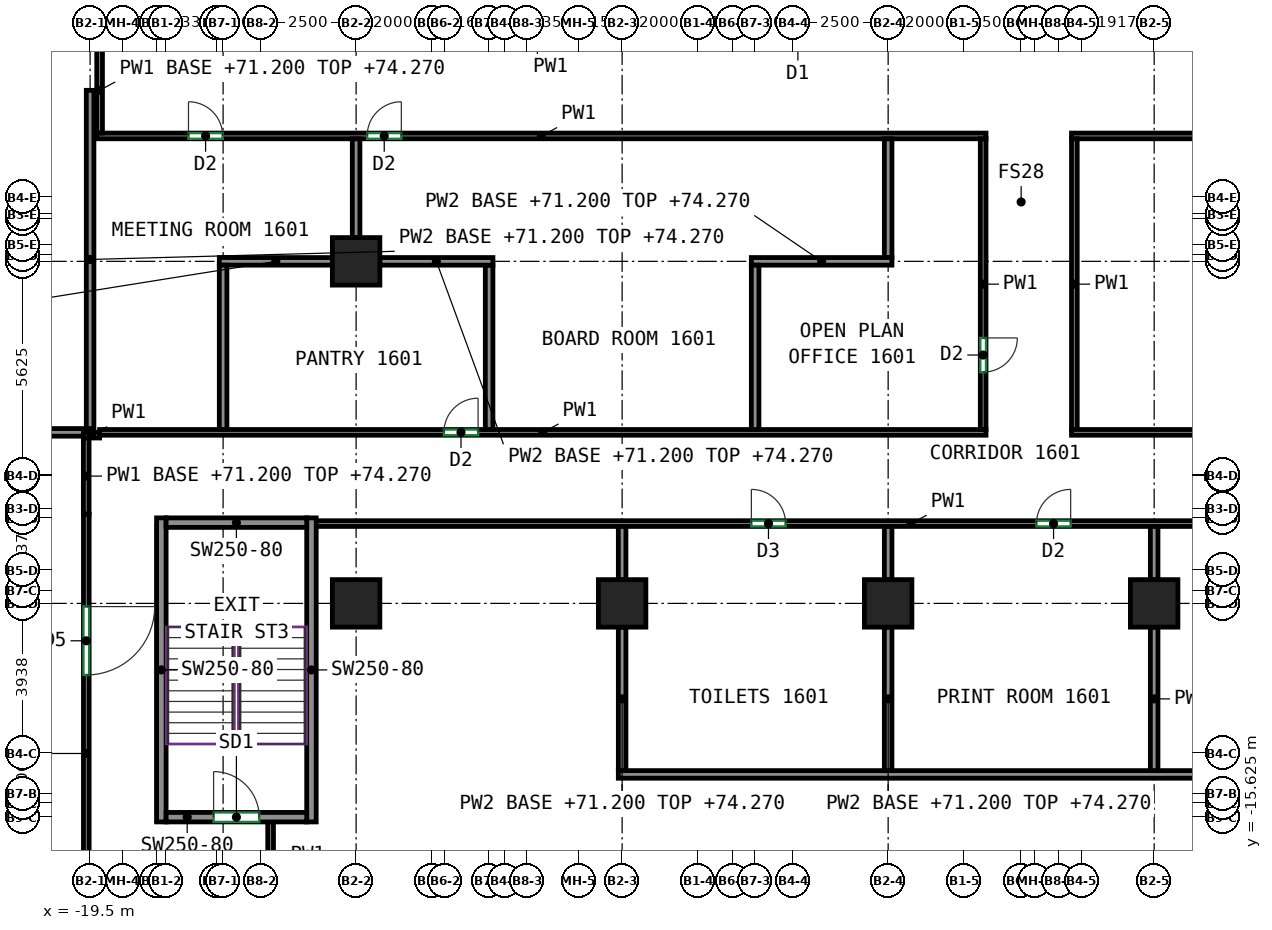
"""IFC4 building model, lengths in metres.
Left out: names, types, materials, properties, quantities, classifications, styles, units other than length and angle.
Written with IfcOpenShell. Run it as: python <this file> out.ifc"""

import sys

from ifc_helpers import new_model, si_unit, direction, frame, frame_2d, origin, origin_2d, place, context, subcontext, project, spatial, rectangle, extrude, source, transform, mapped, element, fill, save


model = new_model("IFC4")
c1 = context("Model", 3, precision=1e-05, world=origin(), true_north=direction((0.0, 1.0)))
c2 = subcontext(c1, "Body", "Model", "MODEL_VIEW")
j1 = project(units=[si_unit("LENGTHUNIT", "METRE"), si_unit("PLANEANGLEUNIT", "RADIAN")], contexts=[c1])
p1 = place(None, origin())
s1 = spatial("IfcSite", under=j1, at=p1, CompositionType="ELEMENT")
p2 = place(p1, origin())
s2 = spatial("IfcBuilding", under=s1, at=p2, CompositionType="ELEMENT")
p3 = place(p2, frame((0.0, 0.0, 71.2)))
s3 = spatial("IfcBuildingStorey", under=s2, at=p3, CompositionType="ELEMENT", Elevation=71.2)
m1 = source(origin(), c2, "Body", "SweptSolid", [
    extrude(rectangle(XDim=1.25, YDim=1.25, at=origin_2d()), origin(), (0.0, 0.0, 1.0), 3.72),
])
for number, where, z_axis, x_axis in (
    (1, (-12.5, -10.0, 0.0), (0.0, 0.0, 1.0), (1.0, 0.0, 0.0)),
    (2, (-12.5, -1.0, 0.0), (0.0, 0.0, 1.0), (1.0, 0.0, 0.0)),
    (3, (-5.5, -10.0, 0.0), (0.0, 0.0, 1.0), (1.0, 0.0, 0.0)),
    (4, (1.5, -10.0, 0.0), (0.0, 0.0, 1.0), (1.0, 0.0, 0.0)),
    (5, (8.5, -10.0, 0.0), (0.0, 0.0, 1.0), (1.0, 0.0, 0.0)),
):
    element("IfcColumn", number, at=place(p3, frame(where, z_axis=z_axis, x_axis=x_axis)), inside=s3, PredefinedType="COLUMN", context=c2, shape_type="MappedRepresentation", body=[
        mapped(m1, transform((0.0, 0.0, 0.0))),
    ])
m2 = source(origin(), c2, "Body", "SweptSolid", [
    extrude(rectangle(XDim=8.0, YDim=0.25, at=frame_2d((4.0, 0.0))), origin(), (0.0, 0.0, 1.0), 3.72),
])
for number, where, z_axis, x_axis in (
    (6, (-17.625, -15.75, 0.0), (0.0, 0.0, 1.0), (0.0, 1.0, 0.0)),
    (7, (-13.675, -15.75, 0.0), (0.0, 0.0, 1.0), (0.0, 1.0, 0.0)),
):
    element("IfcWall", number, at=place(p3, frame(where, z_axis=z_axis, x_axis=x_axis)), inside=s3, PredefinedType="SHEAR", context=c2, shape_type="MappedRepresentation", body=[
        mapped(m2, transform((0.0, 0.0, 0.0))),
    ])
m3 = source(origin(), c2, "Body", "SweptSolid", [
    extrude(rectangle(XDim=3.7, YDim=0.25, at=frame_2d((1.85, 0.0))), origin(), (0.0, 0.0, 1.0), 3.72),
])
p4 = place(p3, frame((-17.5, -15.625, 0.0), z_axis=(0.0, 0.0, 1.0), x_axis=(1.0, 0.0, 0.0)))
e8 = element("IfcWall", 8, at=p4, inside=s3, PredefinedType="SHEAR", context=c2, shape_type="MappedRepresentation", body=[
    mapped(m3, transform((0.0, 0.0, 0.0))),
])
p5 = place(p4, frame((1.25, 0.0, 0.0)))
e9 = element("IfcOpeningElement", 9, at=p5, cuts=e8, PredefinedType="OPENING", context=c2, shape_type="SweptSolid", body=[
    extrude(rectangle(XDim=1.2, YDim=2.1, at=frame_2d((0.6, 1.05))), frame((0.0, 0.135, 0.0), z_axis=(0.0, -1.0, 0.0), x_axis=(1.0, 0.0, 0.0)), (0.0, 0.0, 1.0), 0.27),
])
p6 = place(p3, frame((-17.5, -7.875, 0.0), z_axis=(0.0, 0.0, 1.0), x_axis=(1.0, 0.0, 0.0)))
e10 = element("IfcWall", 10, at=p6, inside=s3, PredefinedType="SHEAR", context=c2, shape_type="MappedRepresentation", body=[
    mapped(m3, transform((0.0, 0.0, 0.0))),
])
p7 = place(p3, frame((-19.25, -5.573, 0.0), z_axis=(0.0, 0.0, 1.0), x_axis=(-1.0, 0.0, 0.0)))
e11 = element("IfcWall", 11, at=p7, inside=s3, PredefinedType="PARTITIONING", context=c2, shape_type="SweptSolid", body=[
    extrude(rectangle(XDim=0.427, YDim=0.15, at=frame_2d((0.213, 0.0))), origin(), (0.0, 0.0, 1.0), 3.72),
])
p8 = place(p3, frame((-13.6, -7.9, 0.0), z_axis=(0.0, 0.0, 1.0), x_axis=(1.0, 0.0, 0.0)))
e12 = element("IfcWall", 12, at=p8, inside=s3, PredefinedType="PARTITIONING", context=c2, shape_type="SweptSolid", body=[
    extrude(rectangle(XDim=31.4, YDim=0.15, at=frame_2d((15.7, 0.0))), origin(), (0.0, 0.0, 1.0), 3.72),
])
p9 = place(p8, frame((11.501, 0.0, 0.0)))
e13 = element("IfcOpeningElement", 13, at=p9, cuts=e12, PredefinedType="OPENING", context=c2, shape_type="SweptSolid", body=[
    extrude(rectangle(XDim=0.9, YDim=2.1, at=frame_2d((0.45, 1.05))), frame((0.0, 0.085, 0.0), z_axis=(0.0, -1.0, 0.0), x_axis=(1.0, 0.0, 0.0)), (0.0, 0.0, 1.0), 0.17),
])
p10 = place(p8, frame((19.003, 0.0, 0.0)))
e14 = element("IfcOpeningElement", 14, at=p10, cuts=e12, PredefinedType="OPENING", context=c2, shape_type="SweptSolid", body=[
    extrude(rectangle(XDim=0.9, YDim=2.1, at=frame_2d((0.45, 1.05))), frame((0.0, 0.085, 0.0), z_axis=(0.0, -1.0, 0.0), x_axis=(1.0, 0.0, 0.0)), (0.0, 0.0, 1.0), 0.17),
])
p11 = place(p8, frame((23.291, 0.0, 0.0)))
e15 = element("IfcOpeningElement", 15, at=p11, cuts=e12, PredefinedType="OPENING", context=c2, shape_type="SweptSolid", body=[
    extrude(rectangle(XDim=0.9, YDim=2.1, at=frame_2d((0.45, 1.05))), frame((0.0, 0.085, 0.0), z_axis=(0.0, -1.0, 0.0), x_axis=(1.0, 0.0, 0.0)), (0.0, 0.0, 1.0), 0.17),
])
p12 = place(p3, frame((-14.75, -17.475, 0.0), z_axis=(0.0, 0.0, 1.0), x_axis=(0.0, 1.0, 0.0)))
e16 = element("IfcWall", 16, at=p12, inside=s3, PredefinedType="PARTITIONING", context=c2, shape_type="SweptSolid", body=[
    extrude(rectangle(XDim=1.725, YDim=0.15, at=frame_2d((0.863, 0.0))), origin(), (0.0, 0.0, 1.0), 3.72),
])
p13 = place(p3, frame((-19.6, -7.652, 0.0), z_axis=(0.0, 0.0, 1.0), x_axis=(0.0, -1.0, 0.0)))
e17 = element("IfcWall", 17, at=p13, inside=s3, PredefinedType="PARTITIONING", context=c2, shape_type="SweptSolid", body=[
    extrude(rectangle(XDim=8.996, YDim=0.15, at=frame_2d((4.498, 0.0))), origin(), (0.0, 0.0, 1.0), 3.07),
])
p14 = place(p13, frame((2.432, 0.0, 0.0)))
e18 = element("IfcOpeningElement", 18, at=p14, cuts=e17, PredefinedType="OPENING", context=c2, shape_type="SweptSolid", body=[
    extrude(rectangle(XDim=1.8, YDim=2.1, at=frame_2d((0.9, 1.05))), frame((0.0, 0.085, 0.0), z_axis=(0.0, -1.0, 0.0), x_axis=(1.0, 0.0, 0.0)), (0.0, 0.0, 1.0), 0.17),
])
p15 = place(p3, frame((-19.602, -7.652, 0.0), z_axis=(0.0, 0.0, 1.0), x_axis=(0.0, 1.0, 0.0)))
e19 = element("IfcWall", 19, at=p15, inside=s3, PredefinedType="PARTITIONING", context=c2, shape_type="SweptSolid", body=[
    extrude(rectangle(XDim=2.004, YDim=0.15, at=frame_2d((1.002, 0.0))), origin(), (0.0, 0.0, 1.0), 3.07),
])
p16 = place(p3, frame((-19.25, -5.5, 0.0), z_axis=(0.0, 0.0, 1.0), x_axis=(1.0, 0.0, 0.0)))
e20 = element("IfcWall", 20, at=p16, inside=s3, PredefinedType="PARTITIONING", context=c2, shape_type="SweptSolid", body=[
    extrude(rectangle(XDim=23.325, YDim=0.15, at=frame_2d((11.663, 0.0))), origin(), (0.0, 0.0, 1.0), 3.72),
])
p17 = place(p16, frame((9.06, 0.0, 0.0)))
e21 = element("IfcOpeningElement", 21, at=p17, cuts=e20, PredefinedType="OPENING", context=c2, shape_type="SweptSolid", body=[
    extrude(rectangle(XDim=0.9, YDim=2.1, at=frame_2d((0.45, 1.05))), frame((0.0, 0.085, 0.0), z_axis=(0.0, -1.0, 0.0), x_axis=(1.0, 0.0, 0.0)), (0.0, 0.0, 1.0), 0.17),
])
p18 = place(p3, frame((-19.325, 2.3, 0.0), z_axis=(0.0, 0.0, 1.0), x_axis=(1.0, 0.0, 0.0)))
e22 = element("IfcWall", 22, at=p18, inside=s3, PredefinedType="PARTITIONING", context=c2, shape_type="SweptSolid", body=[
    extrude(rectangle(XDim=23.4, YDim=0.15, at=frame_2d((11.7, 0.0))), origin(), (0.0, 0.0, 1.0), 3.72),
])
p19 = place(p18, frame((2.414, 0.0, 0.0)))
e23 = element("IfcOpeningElement", 23, at=p19, cuts=e22, PredefinedType="OPENING", context=c2, shape_type="SweptSolid", body=[
    extrude(rectangle(XDim=0.9, YDim=2.1, at=frame_2d((0.45, 1.05))), frame((0.0, 0.085, 0.0), z_axis=(0.0, -1.0, 0.0), x_axis=(1.0, 0.0, 0.0)), (0.0, 0.0, 1.0), 0.17),
])
p20 = place(p18, frame((7.115, 0.0, 0.0)))
e24 = element("IfcOpeningElement", 24, at=p20, cuts=e22, PredefinedType="OPENING", context=c2, shape_type="SweptSolid", body=[
    extrude(rectangle(XDim=0.9, YDim=2.1, at=frame_2d((0.45, 1.05))), frame((0.0, 0.085, 0.0), z_axis=(0.0, -1.0, 0.0), x_axis=(1.0, 0.0, 0.0)), (0.0, 0.0, 1.0), 0.17),
])
p21 = place(p3, frame((-19.25, 2.375, 0.0), z_axis=(0.0, 0.0, 1.0), x_axis=(0.0, 1.0, 0.0)))
e25 = element("IfcWall", 25, at=p21, inside=s3, PredefinedType="PARTITIONING", context=c2, shape_type="SweptSolid", body=[
    extrude(rectangle(XDim=2.25, YDim=0.15, at=frame_2d((1.125, 0.0))), origin(), (0.0, 0.0, 1.0), 3.07),
])
p22 = place(p3, frame((4.0, 2.225, 0.0), z_axis=(0.0, 0.0, 1.0), x_axis=(0.0, -1.0, 0.0)))
e26 = element("IfcWall", 26, at=p22, inside=s3, PredefinedType="PARTITIONING", context=c2, shape_type="SweptSolid", body=[
    extrude(rectangle(XDim=7.65, YDim=0.15, at=frame_2d((3.825, 0.0))), origin(), (0.0, 0.0, 1.0), 3.72),
])
p23 = place(p22, frame((5.24, 0.0, 0.0)))
e27 = element("IfcOpeningElement", 27, at=p23, cuts=e26, PredefinedType="OPENING", context=c2, shape_type="SweptSolid", body=[
    extrude(rectangle(XDim=0.9, YDim=2.1, at=frame_2d((0.45, 1.05))), frame((0.0, 0.085, 0.0), z_axis=(0.0, -1.0, 0.0), x_axis=(1.0, 0.0, 0.0)), (0.0, 0.0, 1.0), 0.17),
])
p24 = place(p3, frame((6.325, 2.3, 0.0), z_axis=(0.0, 0.0, 1.0), x_axis=(1.0, 0.0, 0.0)))
e28 = element("IfcWall", 28, at=p24, inside=s3, PredefinedType="PARTITIONING", context=c2, shape_type="SweptSolid", body=[
    extrude(rectangle(XDim=23.0, YDim=0.15, at=frame_2d((11.5, 0.0))), origin(), (0.0, 0.0, 1.0), 3.72),
])
p25 = place(p24, frame((9.443, 0.0, 0.0)))
e29 = element("IfcOpeningElement", 29, at=p25, cuts=e28, PredefinedType="OPENING", context=c2, shape_type="SweptSolid", body=[
    extrude(rectangle(XDim=1.0, YDim=2.1, at=frame_2d((0.5, 1.05))), frame((0.0, 0.085, 0.0), z_axis=(0.0, -1.0, 0.0), x_axis=(1.0, 0.0, 0.0)), (0.0, 0.0, 1.0), 0.17),
])
p26 = place(p24, frame((20.381, 0.0, 0.0)))
e30 = element("IfcOpeningElement", 30, at=p26, cuts=e28, PredefinedType="OPENING", context=c2, shape_type="SweptSolid", body=[
    extrude(rectangle(XDim=1.8, YDim=2.1, at=frame_2d((0.9, 1.05))), frame((0.0, 0.085, 0.0), z_axis=(0.0, -1.0, 0.0), x_axis=(1.0, 0.0, 0.0)), (0.0, 0.0, 1.0), 0.17),
])
p27 = place(p3, frame((6.4, -5.425, 0.0), z_axis=(0.0, 0.0, 1.0), x_axis=(0.0, 1.0, 0.0)))
e31 = element("IfcWall", 31, at=p27, inside=s3, PredefinedType="PARTITIONING", context=c2, shape_type="SweptSolid", body=[
    extrude(rectangle(XDim=7.65, YDim=0.15, at=frame_2d((3.825, 0.0))), origin(), (0.0, 0.0, 1.0), 3.72),
])
p28 = place(p3, frame((6.325, -5.5, 0.0), z_axis=(0.0, 0.0, 1.0), x_axis=(1.0, 0.0, 0.0)))
e32 = element("IfcWall", 32, at=p28, inside=s3, PredefinedType="PARTITIONING", context=c2, shape_type="SweptSolid", body=[
    extrude(rectangle(XDim=23.0, YDim=0.15, at=frame_2d((11.5, 0.0))), origin(), (0.0, 0.0, 1.0), 3.72),
])
p29 = place(p3, frame((-19.677, -5.5, 0.0), z_axis=(0.0, 0.0, 1.0), x_axis=(-1.0, 0.0, 0.0)))
e33 = element("IfcWall", 33, at=p29, inside=s3, PredefinedType="PARTITIONING", context=c2, shape_type="SweptSolid", body=[
    extrude(rectangle(XDim=3.073, YDim=0.2, at=frame_2d((1.537, 0.0))), origin(), (0.0, 0.0, 1.0), 3.72),
])
p30 = place(p3, frame((-5.5, -9.375, 0.0), z_axis=(0.0, 0.0, 1.0), x_axis=(0.0, 1.0, 0.0)))
e34 = element("IfcWall", 34, at=p30, inside=s3, PredefinedType="PARTITIONING", context=c2, shape_type="SweptSolid", body=[
    extrude(rectangle(XDim=1.399, YDim=0.2, at=frame_2d((0.699, 0.0))), origin(), (0.0, 0.0, 1.0), 3.72),
])
p31 = place(p3, frame((-5.5, -14.4, 0.0), z_axis=(0.0, 0.0, 1.0), x_axis=(0.0, 1.0, 0.0)))
e35 = element("IfcWall", 35, at=p31, inside=s3, PredefinedType="PARTITIONING", context=c2, shape_type="SweptSolid", body=[
    extrude(rectangle(XDim=3.775, YDim=0.2, at=frame_2d((1.887, 0.0))), origin(), (0.0, 0.0, 1.0), 3.07),
])
p32 = place(p3, frame((-5.6, -14.5, 0.0), z_axis=(0.0, 0.0, 1.0), x_axis=(1.0, 0.0, 0.0)))
e36 = element("IfcWall", 36, at=p32, inside=s3, PredefinedType="PARTITIONING", context=c2, shape_type="SweptSolid", body=[
    extrude(rectangle(XDim=17.7, YDim=0.2, at=frame_2d((8.85, 0.0))), origin(), (0.0, 0.0, 1.0), 3.72),
])
p33 = place(p3, frame((-19.5, 3.5, 0.0), z_axis=(0.0, 0.0, 1.0), x_axis=(0.0, -1.0, 0.0)))
e37 = element("IfcWall", 37, at=p33, inside=s3, PredefinedType="PARTITIONING", context=c2, shape_type="SweptSolid", body=[
    extrude(rectangle(XDim=8.9, YDim=0.2, at=frame_2d((4.45, 0.0))), origin(), (0.0, 0.0, 1.0), 3.07),
])
p34 = place(p3, frame((-16.1, -1.0, 0.0), z_axis=(0.0, 0.0, 1.0), x_axis=(1.0, 0.0, 0.0)))
e38 = element("IfcWall", 38, at=p34, inside=s3, PredefinedType="PARTITIONING", context=c2, shape_type="SweptSolid", body=[
    extrude(rectangle(XDim=2.975, YDim=0.2, at=frame_2d((1.488, 0.0))), origin(), (0.0, 0.0, 1.0), 3.07),
])
p35 = place(p3, frame((-16.0, -5.424, 0.0), z_axis=(0.0, 0.0, 1.0), x_axis=(0.0, 1.0, 0.0)))
e39 = element("IfcWall", 39, at=p35, inside=s3, PredefinedType="PARTITIONING", context=c2, shape_type="SweptSolid", body=[
    extrude(rectangle(XDim=4.324, YDim=0.2, at=frame_2d((2.162, 0.0))), origin(), (0.0, 0.0, 1.0), 3.72),
])
p36 = place(p3, frame((-12.5, -0.375, 0.0), z_axis=(0.0, 0.0, 1.0), x_axis=(0.0, 1.0, 0.0)))
e40 = element("IfcWall", 40, at=p36, inside=s3, PredefinedType="PARTITIONING", context=c2, shape_type="SweptSolid", body=[
    extrude(rectangle(XDim=2.599, YDim=0.2, at=frame_2d((1.3, 0.0))), origin(), (0.0, 0.0, 1.0), 3.72),
])
p37 = place(p3, frame((-9.0, -5.424, 0.0), z_axis=(0.0, 0.0, 1.0), x_axis=(0.0, 1.0, 0.0)))
e41 = element("IfcWall", 41, at=p37, inside=s3, PredefinedType="PARTITIONING", context=c2, shape_type="SweptSolid", body=[
    extrude(rectangle(XDim=4.324, YDim=0.2, at=frame_2d((2.162, 0.0))), origin(), (0.0, 0.0, 1.0), 3.72),
])
p38 = place(p3, frame((-11.875, -1.0, 0.0), z_axis=(0.0, 0.0, 1.0), x_axis=(1.0, 0.0, 0.0)))
e42 = element("IfcWall", 42, at=p38, inside=s3, PredefinedType="PARTITIONING", context=c2, shape_type="SweptSolid", body=[
    extrude(rectangle(XDim=2.975, YDim=0.2, at=frame_2d((1.488, 0.0))), origin(), (0.0, 0.0, 1.0), 3.07),
])
p39 = place(p3, frame((1.5, -0.9, 0.0), z_axis=(0.0, 0.0, 1.0), x_axis=(0.0, 1.0, 0.0)))
e43 = element("IfcWall", 43, at=p39, inside=s3, PredefinedType="PARTITIONING", context=c2, shape_type="SweptSolid", body=[
    extrude(rectangle(XDim=3.124, YDim=0.2, at=frame_2d((1.562, 0.0))), origin(), (0.0, 0.0, 1.0), 3.72),
])
p40 = place(p3, frame((-2.1, -1.0, 0.0), z_axis=(0.0, 0.0, 1.0), x_axis=(1.0, 0.0, 0.0)))
e44 = element("IfcWall", 44, at=p40, inside=s3, PredefinedType="PARTITIONING", context=c2, shape_type="SweptSolid", body=[
    extrude(rectangle(XDim=3.7, YDim=0.2, at=frame_2d((1.85, 0.0))), origin(), (0.0, 0.0, 1.0), 3.07),
])
p41 = place(p3, frame((-2.0, -5.424, 0.0), z_axis=(0.0, 0.0, 1.0), x_axis=(0.0, 1.0, 0.0)))
e45 = element("IfcWall", 45, at=p41, inside=s3, PredefinedType="PARTITIONING", context=c2, shape_type="SweptSolid", body=[
    extrude(rectangle(XDim=4.324, YDim=0.2, at=frame_2d((2.162, 0.0))), origin(), (0.0, 0.0, 1.0), 3.72),
])
p42 = place(p3, frame((1.5, -9.375, 0.0), z_axis=(0.0, 0.0, 1.0), x_axis=(0.0, 1.0, 0.0)))
e46 = element("IfcWall", 46, at=p42, inside=s3, PredefinedType="PARTITIONING", context=c2, shape_type="SweptSolid", body=[
    extrude(rectangle(XDim=1.399, YDim=0.2, at=frame_2d((0.699, 0.0))), origin(), (0.0, 0.0, 1.0), 3.72),
])
p43 = place(p3, frame((1.5, -14.4, 0.0), z_axis=(0.0, 0.0, 1.0), x_axis=(0.0, 1.0, 0.0)))
e47 = element("IfcWall", 47, at=p43, inside=s3, PredefinedType="PARTITIONING", context=c2, shape_type="SweptSolid", body=[
    extrude(rectangle(XDim=3.775, YDim=0.2, at=frame_2d((1.887, 0.0))), origin(), (0.0, 0.0, 1.0), 3.07),
])
p44 = place(p3, frame((8.5, -9.375, 0.0), z_axis=(0.0, 0.0, 1.0), x_axis=(0.0, 1.0, 0.0)))
e48 = element("IfcWall", 48, at=p44, inside=s3, PredefinedType="PARTITIONING", context=c2, shape_type="SweptSolid", body=[
    extrude(rectangle(XDim=1.399, YDim=0.2, at=frame_2d((0.699, 0.0))), origin(), (0.0, 0.0, 1.0), 3.72),
])
p45 = place(p3, frame((8.5, -14.4, 0.0), z_axis=(0.0, 0.0, 1.0), x_axis=(0.0, 1.0, 0.0)))
e49 = element("IfcWall", 49, at=p45, inside=s3, PredefinedType="PARTITIONING", context=c2, shape_type="SweptSolid", body=[
    extrude(rectangle(XDim=3.775, YDim=0.2, at=frame_2d((1.887, 0.0))), origin(), (0.0, 0.0, 1.0), 3.07),
])
p46 = place(p5, origin())
e50 = element("IfcDoor", 50, at=p46, inside=s3, OperationType="DOUBLE_DOOR_SINGLE_SWING", PredefinedType="DOOR", context=c2, shape_type="SweptSolid", body=[
    extrude(rectangle(XDim=1.2, YDim=2.1, at=frame_2d((0.6, 1.05))), frame((0.0, 0.025, 0.0), z_axis=(0.0, -1.0, 0.0), x_axis=(1.0, 0.0, 0.0)), (0.0, 0.0, 1.0), 0.05),
])
fill(e9, e50)
p47 = place(p14, origin())
e51 = element("IfcDoor", 51, at=p47, inside=s3, OperationType="DOUBLE_DOOR_SINGLE_SWING", PredefinedType="DOOR", context=c2, shape_type="SweptSolid", body=[
    extrude(rectangle(XDim=1.8, YDim=2.1, at=frame_2d((0.9, 1.05))), frame((0.0, 0.025, 0.0), z_axis=(0.0, -1.0, 0.0), x_axis=(1.0, 0.0, 0.0)), (0.0, 0.0, 1.0), 0.05),
])
fill(e18, e51)
p48 = place(p9, origin())
e52 = element("IfcDoor", 52, at=p48, inside=s3, OperationType="SINGLE_SWING_LEFT", PredefinedType="DOOR", context=c2, shape_type="SweptSolid", body=[
    extrude(rectangle(XDim=0.9, YDim=2.1, at=frame_2d((0.45, 1.05))), frame((0.0, 0.025, 0.0), z_axis=(0.0, -1.0, 0.0), x_axis=(1.0, 0.0, 0.0)), (0.0, 0.0, 1.0), 0.05),
])
fill(e13, e52)
p49 = place(p10, origin())
e53 = element("IfcDoor", 53, at=p49, inside=s3, OperationType="SINGLE_SWING_RIGHT", PredefinedType="DOOR", context=c2, shape_type="SweptSolid", body=[
    extrude(rectangle(XDim=0.9, YDim=2.1, at=frame_2d((0.45, 1.05))), frame((0.0, 0.025, 0.0), z_axis=(0.0, -1.0, 0.0), x_axis=(1.0, 0.0, 0.0)), (0.0, 0.0, 1.0), 0.05),
])
fill(e14, e53)
p50 = place(p17, origin())
e54 = element("IfcDoor", 54, at=p50, inside=s3, OperationType="SINGLE_SWING_RIGHT", PredefinedType="DOOR", context=c2, shape_type="SweptSolid", body=[
    extrude(rectangle(XDim=0.9, YDim=2.1, at=frame_2d((0.45, 1.05))), frame((0.0, 0.025, 0.0), z_axis=(0.0, -1.0, 0.0), x_axis=(1.0, 0.0, 0.0)), (0.0, 0.0, 1.0), 0.05),
])
fill(e21, e54)
p51 = place(p23, origin())
e55 = element("IfcDoor", 55, at=p51, inside=s3, OperationType="SINGLE_SWING_LEFT", PredefinedType="DOOR", context=c2, shape_type="SweptSolid", body=[
    extrude(rectangle(XDim=0.9, YDim=2.1, at=frame_2d((0.45, 1.05))), frame((0.0, 0.025, 0.0), z_axis=(0.0, -1.0, 0.0), x_axis=(1.0, 0.0, 0.0)), (0.0, 0.0, 1.0), 0.05),
])
fill(e27, e55)
p52 = place(p19, origin())
e56 = element("IfcDoor", 56, at=p52, inside=s3, OperationType="SINGLE_SWING_LEFT", PredefinedType="DOOR", context=c2, shape_type="SweptSolid", body=[
    extrude(rectangle(XDim=0.9, YDim=2.1, at=frame_2d((0.45, 1.05))), frame((0.0, 0.025, 0.0), z_axis=(0.0, -1.0, 0.0), x_axis=(1.0, 0.0, 0.0)), (0.0, 0.0, 1.0), 0.05),
])
fill(e23, e56)
p53 = place(p20, origin())
e57 = element("IfcDoor", 57, at=p53, inside=s3, OperationType="SINGLE_SWING_RIGHT", PredefinedType="DOOR", context=c2, shape_type="SweptSolid", body=[
    extrude(rectangle(XDim=0.9, YDim=2.1, at=frame_2d((0.45, 1.05))), frame((0.0, 0.025, 0.0), z_axis=(0.0, -1.0, 0.0), x_axis=(1.0, 0.0, 0.0)), (0.0, 0.0, 1.0), 0.05),
])
fill(e24, e57)
save(model, sys.argv[1])
